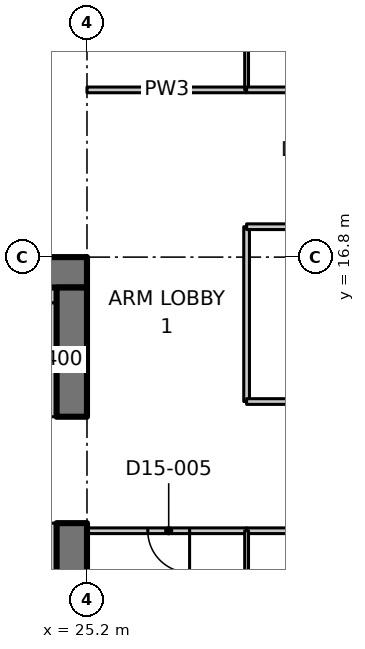
"""IFC4 building model, lengths in metres.
Left out: names, types, materials, properties, quantities, classifications, styles, units other than length and angle.
Written with IfcOpenShell. Run it as: python <this file> out.ifc"""

import sys

from ifc_helpers import new_model, si_unit, direction, frame, frame_2d, origin, place, context, subcontext, project, spatial, polyline, rectangle, outline, extrude, element, fill, save


model = new_model("IFC4")
c1 = context("Model", 3, precision=1e-05, world=origin(), true_north=direction((0.0, 1.0)))
c2 = subcontext(c1, "Body", "Model", "MODEL_VIEW")
j1 = project(units=[si_unit("LENGTHUNIT", "METRE"), si_unit("PLANEANGLEUNIT", "RADIAN")], contexts=[c1])
p1 = place(None, origin())
s1 = spatial("IfcSite", under=j1, at=p1, CompositionType="ELEMENT")
p2 = place(p1, origin())
s2 = spatial("IfcBuilding", under=s1, at=p2, CompositionType="ELEMENT")
p3 = place(p2, frame((0.0, 0.0, 116.9)))
s3 = spatial("IfcBuildingStorey", under=s2, at=p3, CompositionType="ELEMENT", Elevation=116.9)
p4 = place(p3, frame((23.8, 16.4, 0.0), z_axis=(0.0, 0.0, 1.0), x_axis=(1.0, 0.0, 0.0)))
e1 = element("IfcWall", 1, at=p4, inside=s3, PredefinedType="SHEAR", context=c2, shape_type="SweptSolid", body=[
    extrude(rectangle(XDim=1.4, YDim=0.8, at=frame_2d((0.7, 0.0))), origin(), (0.0, 0.0, 1.0), 3.35),
])
p5 = place(p3, frame((24.8, 0.8, 0.0), z_axis=(0.0, 0.0, 1.0), x_axis=(0.0, 1.0, 0.0)))
e2 = element("IfcWall", 2, at=p5, inside=s3, PredefinedType="SHEAR", context=c2, shape_type="SweptSolid", body=[
    extrude(rectangle(XDim=9.0, YDim=0.8, at=frame_2d((4.5, 0.0))), origin(), (0.0, 0.0, 1.0), 3.35),
])
p6 = place(p3, frame((24.8, 12.6, 0.0), z_axis=(0.0, 0.0, 1.0), x_axis=(0.0, 1.0, 0.0)))
e3 = element("IfcWall", 3, at=p6, inside=s3, PredefinedType="SHEAR", context=c2, shape_type="SweptSolid", body=[
    extrude(rectangle(XDim=3.4, YDim=0.8, at=frame_2d((1.7, 0.0))), origin(), (0.0, 0.0, 1.0), 3.35),
])
p7 = place(p3, frame((24.2, 12.6, 0.0), z_axis=(0.0, 0.0, 1.0), x_axis=(0.0, 1.0, 0.0)))
e4 = element("IfcWall", 4, at=p7, inside=s3, PredefinedType="PARTITIONING", context=c2, shape_type="SweptSolid", body=[
    extrude(rectangle(XDim=3.0, YDim=0.4, at=frame_2d((1.5, 0.0))), origin(), (0.0, 0.0, 1.0), 3.35),
])
p8 = place(p3, frame((23.8, 15.8, 0.0), z_axis=(0.0, 0.0, 1.0), x_axis=(1.0, 0.0, 0.0)))
e5 = element("IfcWall", 5, at=p8, inside=s3, PredefinedType="PARTITIONING", context=c2, shape_type="SweptSolid", body=[
    extrude(rectangle(XDim=0.6, YDim=0.4, at=frame_2d((0.3, 0.0))), origin(), (0.0, 0.0, 1.0), 3.35),
])
p9 = place(p3, frame((24.2, 4.35, 0.0), z_axis=(0.0, 0.0, 1.0), x_axis=(0.0, 1.0, 0.0)))
e6 = element("IfcWall", 6, at=p9, inside=s3, PredefinedType="PARTITIONING", context=c2, shape_type="SweptSolid", body=[
    extrude(rectangle(XDim=5.45, YDim=0.4, at=frame_2d((2.725, 0.0))), origin(), (0.0, 0.0, 1.0), 3.35),
])
p10 = place(p3, frame((25.2, 21.2, 0.0), z_axis=(0.0, 0.0, 1.0), x_axis=(1.0, 0.0, 0.0)))
e7 = element("IfcWall", 7, at=p10, inside=s3, PredefinedType="PARTITIONING", context=c2, shape_type="SweptSolid", body=[
    extrude(rectangle(XDim=4.2, YDim=0.15, at=frame_2d((2.1, 0.0))), origin(), (0.0, 0.0, 1.0), 3.33),
])
p11 = place(p3, frame((29.4, 17.6, 0.0), z_axis=(0.0, 0.0, 1.0), x_axis=(0.0, -1.0, 0.0)))
e8 = element("IfcWall", 8, at=p11, inside=s3, PredefinedType="PARTITIONING", context=c2, shape_type="SweptSolid", body=[
    extrude(rectangle(XDim=4.6, YDim=0.15, at=frame_2d((2.3, 0.0))), origin(), (0.0, 0.0, 1.0), 3.33),
])
p12 = place(p3, frame((29.4, 9.6, 0.0), z_axis=(0.0, 0.0, 1.0), x_axis=(-1.0, 0.0, 0.0)))
e9 = element("IfcWall", 9, at=p12, inside=s3, PredefinedType="PARTITIONING", context=c2, shape_type="SweptSolid", body=[
    extrude(rectangle(XDim=4.2, YDim=0.15, at=frame_2d((2.1, 0.0))), origin(), (0.0, 0.0, 1.0), 3.33),
])
p13 = place(p12, frame((1.5, 0.0, 0.0)))
e10 = element("IfcOpeningElement", 10, at=p13, cuts=e9, PredefinedType="OPENING", context=c2, shape_type="SweptSolid", body=[
    extrude(rectangle(XDim=1.1, YDim=2.1, at=frame_2d((0.55, 1.05))), frame((0.0, 0.085, 0.0), z_axis=(0.0, -1.0, 0.0), x_axis=(1.0, 0.0, 0.0)), (0.0, 0.0, 1.0), 0.17),
])
p14 = place(p3, frame((29.4, 27.429, 0.0), z_axis=(0.0, 0.0, 1.0), x_axis=(0.0, -1.0, 0.0)))
e11 = element("IfcWall", 11, at=p14, inside=s3, PredefinedType="PARTITIONING", context=c2, shape_type="SweptSolid", body=[
    extrude(outline(polyline([(0.0, 0.0), (6.229, 0.0), (6.229, 3.33), (2.679, 3.33), (2.677, 2.98), (1.781, 2.98), (1.779, 3.33), (0.154, 3.33), (0.0, 3.33), (0.0, 0.0)])), frame((0.0, 0.05, 0.0), z_axis=(0.0, -1.0, 0.0), x_axis=(1.0, 0.0, 0.0)), (0.0, 0.0, 1.0), 0.1),
])
p15 = place(p3, frame((29.4, 13.0, 0.0), z_axis=(0.0, 0.0, 1.0), x_axis=(1.0, 0.0, 0.0)))
e12 = element("IfcWall", 12, at=p15, inside=s3, PredefinedType="PARTITIONING", context=c2, shape_type="SweptSolid", body=[
    extrude(rectangle(XDim=11.8, YDim=0.15, at=frame_2d((5.9, 0.0))), origin(), (0.0, 0.0, 1.0), 3.33),
])
p16 = place(p3, frame((33.6, 9.6, 0.0), z_axis=(0.0, 0.0, 1.0), x_axis=(-1.0, 0.0, 0.0)))
e13 = element("IfcWall", 13, at=p16, inside=s3, PredefinedType="PARTITIONING", context=c2, shape_type="SweptSolid", body=[
    extrude(rectangle(XDim=4.2, YDim=0.15, at=frame_2d((2.1, 0.0))), origin(), (0.0, 0.0, 1.0), 3.33),
])
p17 = place(p16, frame((1.5, 0.0, 0.0)))
e14 = element("IfcOpeningElement", 14, at=p17, cuts=e13, PredefinedType="OPENING", context=c2, shape_type="SweptSolid", body=[
    extrude(rectangle(XDim=1.1, YDim=2.1, at=frame_2d((0.55, 1.05))), frame((0.0, 0.085, 0.0), z_axis=(0.0, -1.0, 0.0), x_axis=(1.0, 0.0, 0.0)), (0.0, 0.0, 1.0), 0.17),
])
p18 = place(p3, frame((41.2, 17.6, 0.0), z_axis=(0.0, 0.0, 1.0), x_axis=(-1.0, 0.0, 0.0)))
e15 = element("IfcWall", 15, at=p18, inside=s3, PredefinedType="PARTITIONING", context=c2, shape_type="SweptSolid", body=[
    extrude(rectangle(XDim=11.8, YDim=0.15, at=frame_2d((5.9, 0.0))), origin(), (0.0, 0.0, 1.0), 3.33),
])
p19 = place(p18, frame((5.4, 0.0, 0.0)))
e16 = element("IfcOpeningElement", 16, at=p19, cuts=e15, PredefinedType="OPENING", context=c2, shape_type="SweptSolid", body=[
    extrude(rectangle(XDim=1.1, YDim=2.1, at=frame_2d((0.55, 1.05))), frame((0.0, 0.085, 0.0), z_axis=(0.0, -1.0, 0.0), x_axis=(1.0, 0.0, 0.0)), (0.0, 0.0, 1.0), 0.17),
])
p20 = place(p3, frame((29.4, 21.2, 0.0), z_axis=(0.0, 0.0, 1.0), x_axis=(1.0, 0.0, 0.0)))
e17 = element("IfcWall", 17, at=p20, inside=s3, PredefinedType="PARTITIONING", context=c2, shape_type="SweptSolid", body=[
    extrude(rectangle(XDim=4.2, YDim=0.15, at=frame_2d((2.1, 0.0))), origin(), (0.0, 0.0, 1.0), 3.33),
])
p21 = place(p20, frame((1.5, 0.0, 0.0)))
e18 = element("IfcOpeningElement", 18, at=p21, cuts=e17, PredefinedType="OPENING", context=c2, shape_type="SweptSolid", body=[
    extrude(rectangle(XDim=1.1, YDim=2.1, at=frame_2d((0.55, 1.05))), frame((0.0, 0.085, 0.0), z_axis=(0.0, -1.0, 0.0), x_axis=(1.0, 0.0, 0.0)), (0.0, 0.0, 1.0), 0.17),
])
p22 = place(p3, frame((29.4, 9.6, 0.0), z_axis=(0.0, 0.0, 1.0), x_axis=(0.0, -1.0, 0.0)))
e19 = element("IfcWall", 19, at=p22, inside=s3, PredefinedType="PARTITIONING", context=c2, shape_type="SweptSolid", body=[
    extrude(outline(polyline([(0.0, 0.0), (10.965, 0.0), (10.965, 3.33), (10.7, 3.33), (10.05, 3.33), (10.048, 2.98), (9.152, 2.98), (9.15, 3.33), (0.0, 3.33), (0.0, 0.0)])), frame((0.0, 0.05, 0.0), z_axis=(0.0, -1.0, 0.0), x_axis=(1.0, 0.0, 0.0)), (0.0, 0.0, 1.0), 0.1),
])
p23 = place(p13, origin())
e20 = element("IfcDoor", 20, at=p23, inside=s3, OperationType="SINGLE_SWING_LEFT", PredefinedType="DOOR", context=c2, shape_type="SweptSolid", body=[
    extrude(rectangle(XDim=1.1, YDim=2.1, at=frame_2d((0.55, 1.05))), frame((0.0, 0.025, 0.0), z_axis=(0.0, -1.0, 0.0), x_axis=(1.0, 0.0, 0.0)), (0.0, 0.0, 1.0), 0.05),
])
fill(e10, e20)
save(model, sys.argv[1])
